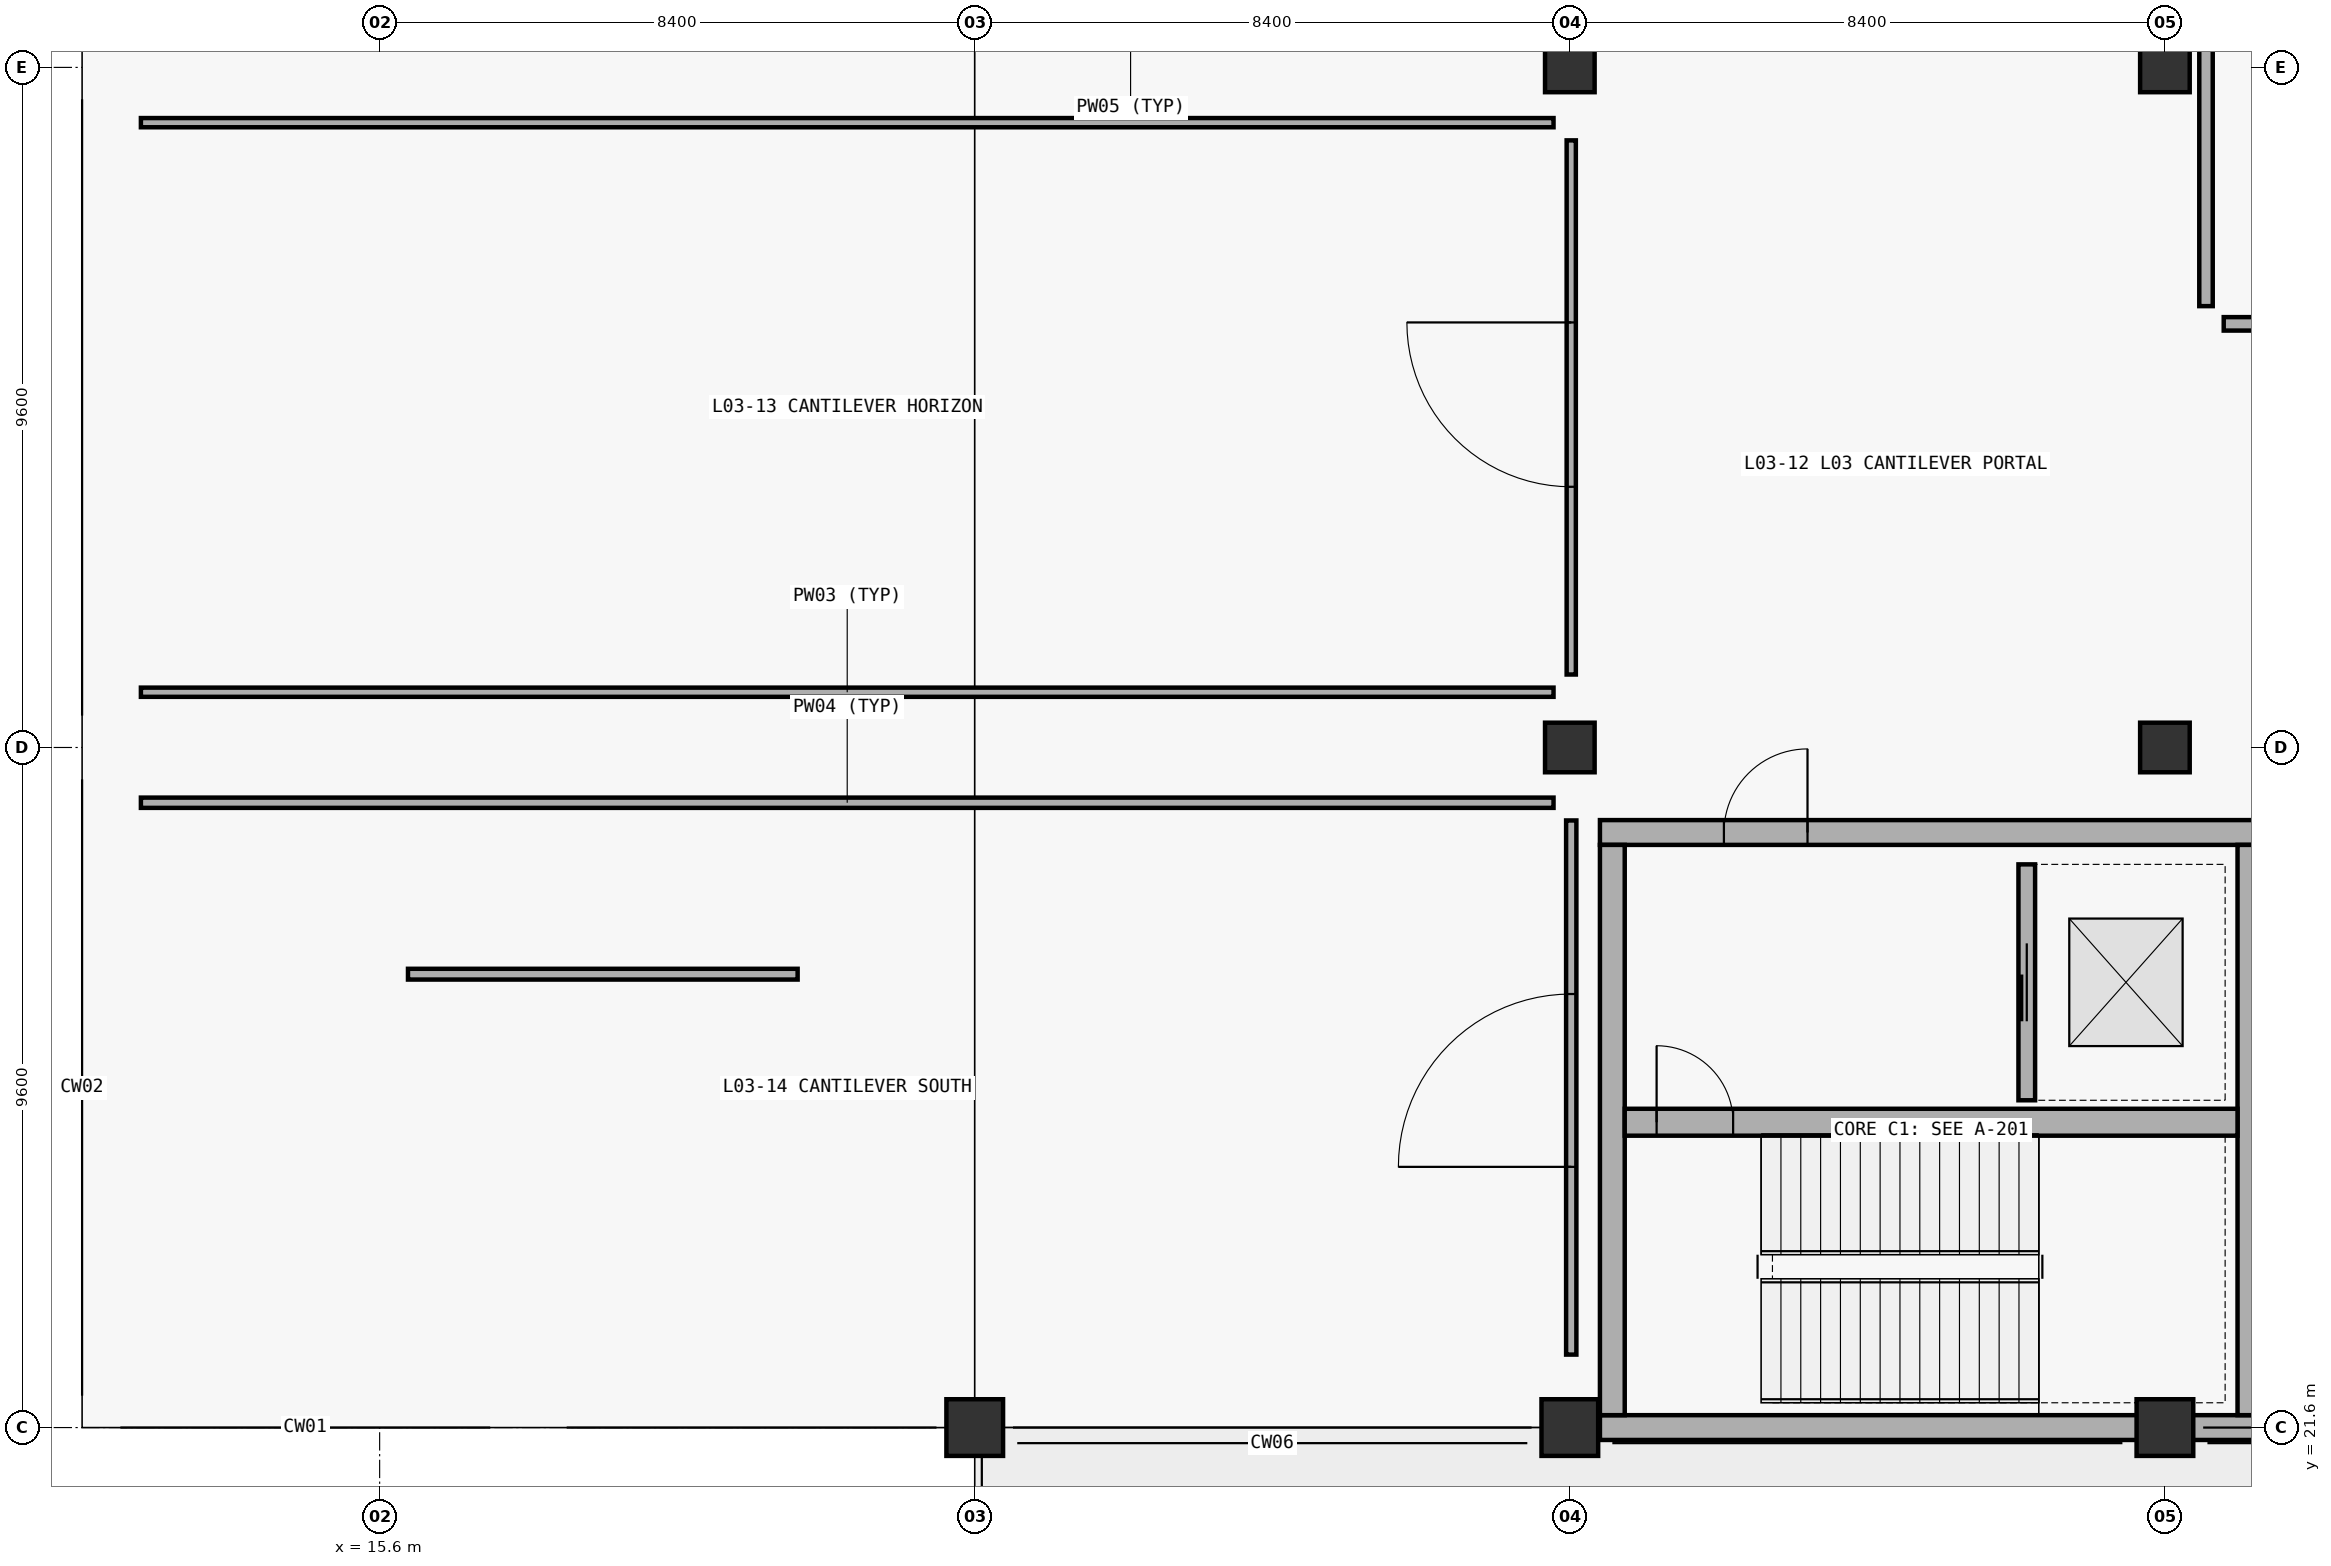
"""IFC4 building model, lengths in metres.
Left out: names, types, materials, properties, quantities, classifications, styles, units other than length and angle.
Written with IfcOpenShell. Run it as: python <this file> out.ifc"""

import sys

from ifc_helpers import new_model, si_unit, direction, frame, frame_2d, origin, origin_2d, place, context, subcontext, project, spatial, rectangle, extrude, element, fill, save


model = new_model("IFC4")
c1 = context("Model", 3, precision=1e-05, world=origin(), true_north=direction((0.0, 1.0)))
c2 = subcontext(c1, "Body", "Model", "MODEL_VIEW")
j1 = project(units=[si_unit("LENGTHUNIT", "METRE"), si_unit("PLANEANGLEUNIT", "RADIAN")], contexts=[c1])
p1 = place(None, origin())
s1 = spatial("IfcSite", under=j1, at=p1, CompositionType="ELEMENT")
p2 = place(p1, origin())
s2 = spatial("IfcBuilding", under=s1, at=p2, CompositionType="ELEMENT")
p3 = place(p2, frame((0.0, 0.0, 15.6)))
s3 = spatial("IfcBuildingStorey", under=s2, at=p3, CompositionType="ELEMENT", Elevation=15.6)
for number, where, z_axis, x_axis in (
    (1, (24.0, 21.6, 0.0), (0.0, 0.0, 1.0), (1.0, 0.0, 0.0)),
    (2, (32.4, 21.6, 0.0), (0.0, 0.0, 1.0), (1.0, 0.0, 0.0)),
):
    element("IfcColumn", number, at=place(p3, frame(where, z_axis=z_axis, x_axis=x_axis)), inside=s3, PredefinedType="COLUMN", context=c2, shape_type="SweptSolid", body=[
        extrude(rectangle(XDim=0.8, YDim=0.8, at=origin_2d()), origin(), (0.0, 0.0, 1.0), 5.1),
    ])
for number, where, z_axis, x_axis in (
    (3, (32.4, 31.2, 0.0), (0.0, 0.0, 1.0), (1.0, 0.0, 0.0)),
    (4, (32.4, 40.8, 0.0), (0.0, 0.0, 1.0), (1.0, 0.0, 0.0)),
):
    element("IfcColumn", number, at=place(p3, frame(where, z_axis=z_axis, x_axis=x_axis)), inside=s3, PredefinedType="COLUMN", context=c2, shape_type="SweptSolid", body=[
        extrude(rectangle(XDim=0.7, YDim=0.7, at=origin_2d()), origin(), (0.0, 0.0, 1.0), 5.1),
    ])
p4 = place(p3, frame((40.8, 21.6, 0.0), z_axis=(0.0, 0.0, 1.0), x_axis=(1.0, 0.0, 0.0)))
e5 = element("IfcColumn", 5, at=p4, inside=s3, PredefinedType="COLUMN", context=c2, shape_type="SweptSolid", body=[
    extrude(rectangle(XDim=0.8, YDim=0.8, at=origin_2d()), origin(), (0.0, 0.0, 1.0), 5.1),
])
for number, where, z_axis, x_axis in (
    (6, (40.8, 31.2, 0.0), (0.0, 0.0, 1.0), (1.0, 0.0, 0.0)),
    (7, (40.8, 40.8, 0.0), (0.0, 0.0, 1.0), (1.0, 0.0, 0.0)),
):
    element("IfcColumn", number, at=place(p3, frame(where, z_axis=z_axis, x_axis=x_axis)), inside=s3, PredefinedType="COLUMN", context=c2, shape_type="SweptSolid", body=[
        extrude(rectangle(XDim=0.7, YDim=0.7, at=origin_2d()), origin(), (0.0, 0.0, 1.0), 5.1),
    ])
p5 = place(p3, frame((32.825, 21.6, 0.0), z_axis=(0.0, 0.0, 1.0), x_axis=(1.0, 0.0, 0.0)))
e8 = element("IfcWall", 8, at=p5, inside=s3, PredefinedType="SHEAR", context=c2, shape_type="SweptSolid", body=[
    extrude(rectangle(XDim=9.35, YDim=0.35, at=frame_2d((4.675, 0.0))), origin(), (0.0, 0.0, 1.0), 5.1),
])
p6 = place(p3, frame((32.825, 30.0, 0.0), z_axis=(0.0, 0.0, 1.0), x_axis=(1.0, 0.0, 0.0)))
e9 = element("IfcWall", 9, at=p6, inside=s3, PredefinedType="SHEAR", context=c2, shape_type="SweptSolid", body=[
    extrude(rectangle(XDim=9.35, YDim=0.35, at=frame_2d((4.675, 0.0))), origin(), (0.0, 0.0, 1.0), 5.1),
])
p7 = place(p6, frame((1.75, 0.0, 0.0)))
e10 = element("IfcOpeningElement", 10, at=p7, cuts=e9, PredefinedType="OPENING", context=c2, shape_type="SweptSolid", body=[
    extrude(rectangle(XDim=1.18, YDim=2.24, at=frame_2d((0.59, 1.12))), frame((0.0, 0.185, 0.0), z_axis=(0.0, -1.0, 0.0), x_axis=(1.0, 0.0, 0.0)), (0.0, 0.0, 1.0), 0.37),
])
for number, where, z_axis, x_axis in (
    (11, (33.0, 21.775, 0.0), (0.0, 0.0, 1.0), (0.0, 1.0, 0.0)),
    (12, (42.0, 21.775, 0.0), (0.0, 0.0, 1.0), (0.0, 1.0, 0.0)),
):
    element("IfcWall", number, at=place(p3, frame(where, z_axis=z_axis, x_axis=x_axis)), inside=s3, PredefinedType="SHEAR", context=c2, shape_type="SweptSolid", body=[
        extrude(rectangle(XDim=8.05, YDim=0.35, at=frame_2d((4.025, 0.0))), origin(), (0.0, 0.0, 1.0), 5.1),
    ])
p8 = place(p3, frame((33.175, 25.91, 0.0), z_axis=(0.0, 0.0, 1.0), x_axis=(1.0, 0.0, 0.0)))
e13 = element("IfcWall", 13, at=p8, inside=s3, PredefinedType="SHEAR", context=c2, shape_type="SweptSolid", body=[
    extrude(rectangle(XDim=8.65, YDim=0.38, at=frame_2d((4.325, 0.0))), origin(), (0.0, 0.0, 1.0), 5.1),
])
p9 = place(p8, frame((0.45, 0.0, 0.0)))
e14 = element("IfcOpeningElement", 14, at=p9, cuts=e13, PredefinedType="OPENING", context=c2, shape_type="SweptSolid", body=[
    extrude(rectangle(XDim=1.08, YDim=2.18, at=frame_2d((0.54, 1.09))), frame((0.0, 0.2, 0.0), z_axis=(0.0, -1.0, 0.0), x_axis=(1.0, 0.0, 0.0)), (0.0, 0.0, 1.0), 0.4),
])
p10 = place(p3, frame((38.85, 26.22, 0.0), z_axis=(0.0, 0.0, 1.0), x_axis=(0.0, 1.0, 0.0)))
e15 = element("IfcWall", 15, at=p10, inside=s3, PredefinedType="PARTITIONING", context=c2, shape_type="SweptSolid", body=[
    extrude(rectangle(XDim=3.33, YDim=0.235, at=frame_2d((1.665, 0.0))), origin(), (0.0, 0.0, 1.0), 4.72),
])
p11 = place(p10, frame((1.115, 0.0, 0.0)))
e16 = element("IfcOpeningElement", 16, at=p11, cuts=e15, PredefinedType="OPENING", context=c2, shape_type="SweptSolid", body=[
    extrude(rectangle(XDim=1.1, YDim=2.2, at=frame_2d((0.55, 1.1))), frame((0.0, 0.127, 0.0), z_axis=(0.0, -1.0, 0.0), x_axis=(1.0, 0.0, 0.0)), (0.0, 0.0, 1.0), 0.255),
])
p12 = place(p3, frame((32.42, 32.23, 0.0), z_axis=(0.0, 0.0, 1.0), x_axis=(0.0, 1.0, 0.0)))
e17 = element("IfcWall", 17, at=p12, inside=s3, PredefinedType="PARTITIONING", context=c2, shape_type="SweptSolid", body=[
    extrude(rectangle(XDim=7.54, YDim=0.13, at=frame_2d((3.77, 0.0))), origin(), (0.0, 0.0, 1.0), 4.11),
])
p13 = place(p12, frame((2.65, 0.0, 0.0)))
e18 = element("IfcOpeningElement", 18, at=p13, cuts=e17, PredefinedType="OPENING", context=c2, shape_type="SweptSolid", body=[
    extrude(rectangle(XDim=2.32, YDim=2.7, at=frame_2d((1.16, 1.35))), frame((0.0, 0.075, 0.0), z_axis=(0.0, -1.0, 0.0), x_axis=(1.0, 0.0, 0.0)), (0.0, 0.0, 1.0), 0.15),
])
for number, where, z_axis, x_axis in (
    (19, (12.23, 31.98, 0.0), (0.0, 0.0, 1.0), (1.0, 0.0, 0.0)),
    (20, (12.23, 40.02, 0.0), (0.0, 0.0, 1.0), (1.0, 0.0, 0.0)),
):
    element("IfcWall", number, at=place(p3, frame(where, z_axis=z_axis, x_axis=x_axis)), inside=s3, PredefinedType="PARTITIONING", context=c2, shape_type="SweptSolid", body=[
        extrude(rectangle(XDim=19.94, YDim=0.13, at=frame_2d((9.97, 0.0))), origin(), (0.0, 0.0, 1.0), 4.11),
    ])
p14 = place(p3, frame((32.42, 22.63, 0.0), z_axis=(0.0, 0.0, 1.0), x_axis=(0.0, 1.0, 0.0)))
e21 = element("IfcWall", 21, at=p14, inside=s3, PredefinedType="PARTITIONING", context=c2, shape_type="SweptSolid", body=[
    extrude(rectangle(XDim=7.54, YDim=0.145, at=frame_2d((3.77, 0.0))), origin(), (0.0, 0.0, 1.0), 3.81),
])
p15 = place(p14, frame((2.65, 0.0, 0.0)))
e22 = element("IfcOpeningElement", 22, at=p15, cuts=e21, PredefinedType="OPENING", context=c2, shape_type="SweptSolid", body=[
    extrude(rectangle(XDim=2.44, YDim=2.76, at=frame_2d((1.22, 1.38))), frame((0.0, 0.083, 0.0), z_axis=(0.0, -1.0, 0.0), x_axis=(1.0, 0.0, 0.0)), (0.0, 0.0, 1.0), 0.165),
])
p16 = place(p3, frame((12.23, 30.42, 0.0), z_axis=(0.0, 0.0, 1.0), x_axis=(1.0, 0.0, 0.0)))
e23 = element("IfcWall", 23, at=p16, inside=s3, PredefinedType="PARTITIONING", context=c2, shape_type="SweptSolid", body=[
    extrude(rectangle(XDim=19.94, YDim=0.145, at=frame_2d((9.97, 0.0))), origin(), (0.0, 0.0, 1.0), 3.81),
])
p17 = place(p3, frame((41.63, 37.18, 0.0), z_axis=(0.0, 0.0, 1.0), x_axis=(1.0, 0.0, 0.0)))
e24 = element("IfcWall", 24, at=p17, inside=s3, PredefinedType="PARTITIONING", context=c2, shape_type="SweptSolid", body=[
    extrude(rectangle(XDim=16.34, YDim=0.19, at=frame_2d((8.17, 0.0))), origin(), (0.0, 0.0, 1.0), 3.91),
])
p18 = place(p17, frame((11.15, 0.0, 0.0)))
e25 = element("IfcOpeningElement", 25, at=p18, cuts=e24, PredefinedType="OPENING", context=c2, shape_type="SweptSolid", body=[
    extrude(rectangle(XDim=1.16, YDim=2.34, at=frame_2d((0.58, 1.17))), frame((0.0, 0.105, 0.0), z_axis=(0.0, -1.0, 0.0), x_axis=(1.0, 0.0, 0.0)), (0.0, 0.0, 1.0), 0.21),
])
p19 = place(p3, frame((41.38, 37.43, 0.0), z_axis=(0.0, 0.0, 1.0), x_axis=(0.0, 1.0, 0.0)))
e26 = element("IfcWall", 26, at=p19, inside=s3, PredefinedType="PARTITIONING", context=c2, shape_type="SweptSolid", body=[
    extrude(rectangle(XDim=12.14, YDim=0.19, at=frame_2d((6.07, 0.0))), origin(), (0.0, 0.0, 1.0), 4.11),
])
p20 = place(p3, frame((16.0, 28.0, 0.0), z_axis=(0.0, 0.0, 1.0), x_axis=(1.0, 0.0, 0.0)))
e27 = element("IfcWall", 27, at=p20, inside=s3, PredefinedType="MOVABLE", context=c2, shape_type="SweptSolid", body=[
    extrude(rectangle(XDim=5.5, YDim=0.152, at=frame_2d((2.75, 0.0))), origin(), (0.0, 0.0, 1.0), 3.2),
])
p21 = place(p9, origin())
e28 = element("IfcDoor", 28, at=p21, inside=s3, OperationType="SINGLE_SWING_LEFT", PredefinedType="DOOR", context=c2, shape_type="SweptSolid", body=[
    extrude(rectangle(XDim=1.08, YDim=2.18, at=frame_2d((0.54, 1.09))), frame((0.0, 0.025, 0.0), z_axis=(0.0, -1.0, 0.0), x_axis=(1.0, 0.0, 0.0)), (0.0, 0.0, 1.0), 0.05),
])
fill(e14, e28)
p22 = place(p7, origin())
e29 = element("IfcDoor", 29, at=p22, inside=s3, OperationType="SINGLE_SWING_RIGHT", PredefinedType="DOOR", context=c2, shape_type="SweptSolid", body=[
    extrude(rectangle(XDim=1.18, YDim=2.24, at=frame_2d((0.59, 1.12))), frame((0.0, 0.025, 0.0), z_axis=(0.0, -1.0, 0.0), x_axis=(1.0, 0.0, 0.0)), (0.0, 0.0, 1.0), 0.05),
])
fill(e10, e29)
p23 = place(p11, origin())
e30 = element("IfcDoor", 30, at=p23, inside=s3, OperationType="SLIDING_TO_LEFT", PredefinedType="DOOR", context=c2, shape_type="SweptSolid", body=[
    extrude(rectangle(XDim=1.1, YDim=2.2, at=frame_2d((0.55, 1.1))), frame((0.0, 0.025, 0.0), z_axis=(0.0, -1.0, 0.0), x_axis=(1.0, 0.0, 0.0)), (0.0, 0.0, 1.0), 0.05),
])
fill(e16, e30)
p24 = place(p13, origin())
e31 = element("IfcDoor", 31, at=p24, inside=s3, OperationType="DOUBLE_SWING_RIGHT", PredefinedType="DOOR", context=c2, shape_type="SweptSolid", body=[
    extrude(rectangle(XDim=2.32, YDim=2.7, at=frame_2d((1.16, 1.35))), frame((0.0, 0.025, 0.0), z_axis=(0.0, -1.0, 0.0), x_axis=(1.0, 0.0, 0.0)), (0.0, 0.0, 1.0), 0.05),
])
fill(e18, e31)
p25 = place(p15, origin())
e32 = element("IfcDoor", 32, at=p25, inside=s3, OperationType="DOUBLE_SWING_LEFT", PredefinedType="DOOR", context=c2, shape_type="SweptSolid", body=[
    extrude(rectangle(XDim=2.44, YDim=2.76, at=frame_2d((1.22, 1.38))), frame((0.0, 0.025, 0.0), z_axis=(0.0, -1.0, 0.0), x_axis=(1.0, 0.0, 0.0)), (0.0, 0.0, 1.0), 0.05),
])
fill(e22, e32)
save(model, sys.argv[1])
